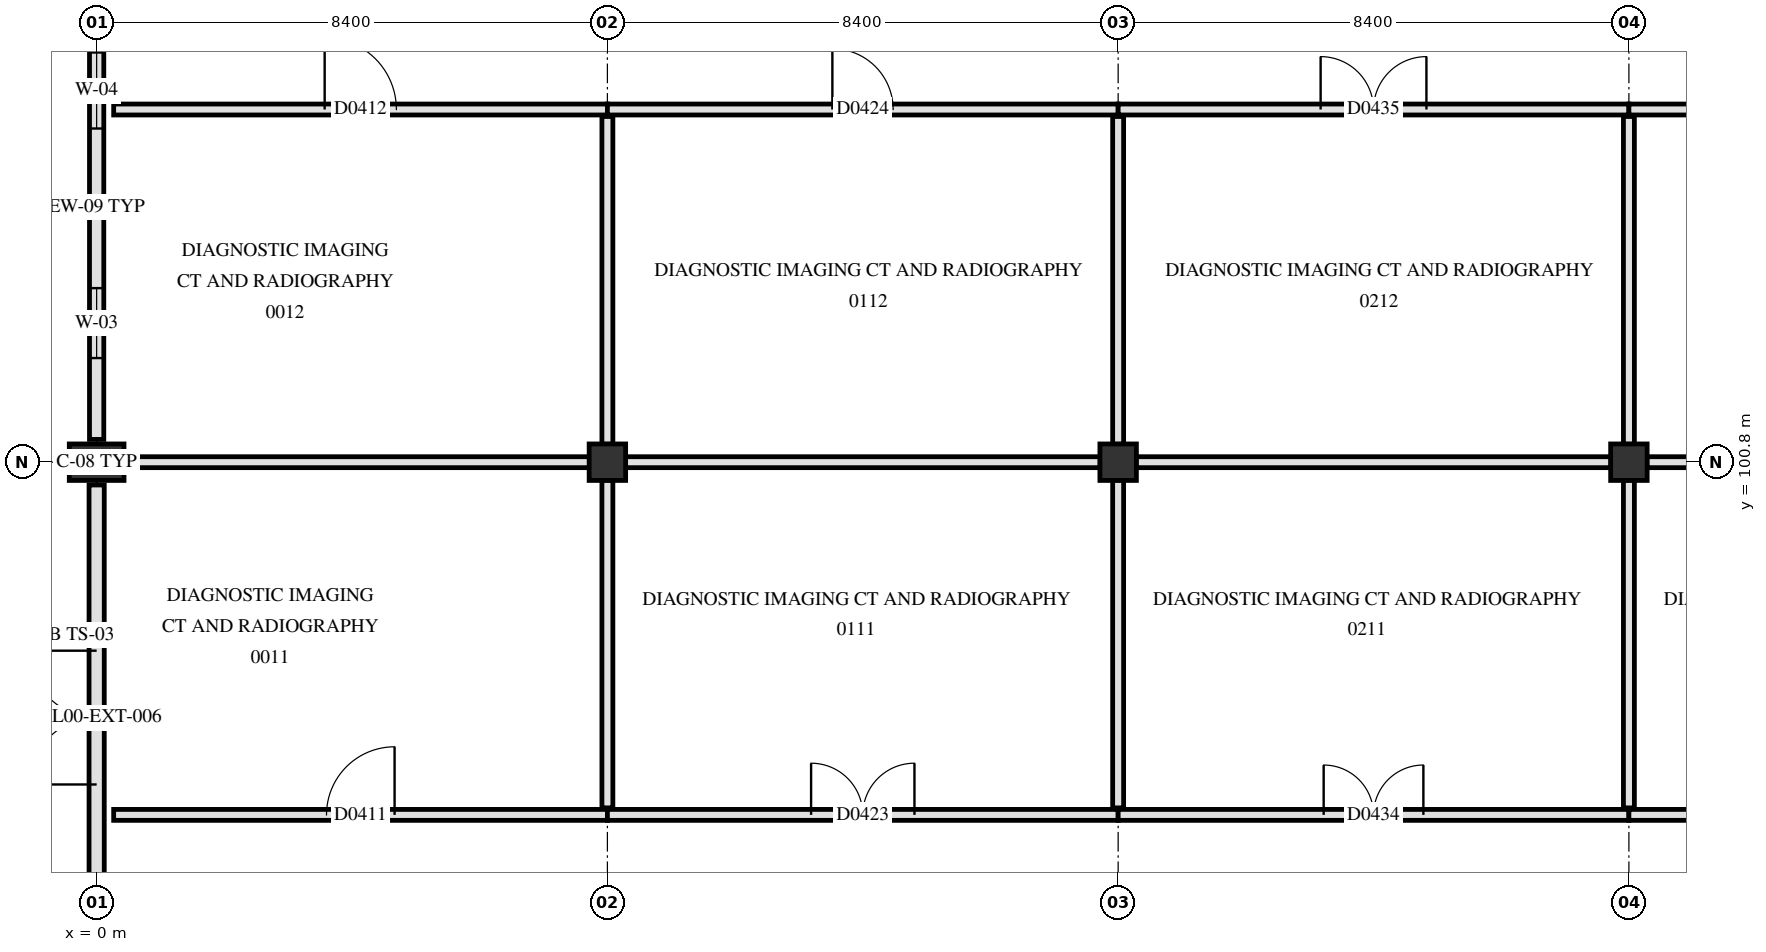
"""IFC4 building model, lengths in metres.
Left out: names, types, materials, properties, quantities, classifications, styles, units other than length and angle.
Written with IfcOpenShell. Run it as: python <this file> out.ifc"""

import sys

from ifc_helpers import new_model, si_unit, direction, frame, frame_2d, origin, origin_2d, place, context, subcontext, project, spatial, rectangle, extrude, element, fill, save


model = new_model("IFC4")
c1 = context("Model", 3, precision=1e-05, world=origin(), true_north=direction((0.0, 1.0)))
c2 = subcontext(c1, "Body", "Model", "MODEL_VIEW")
j1 = project(units=[si_unit("LENGTHUNIT", "METRE"), si_unit("PLANEANGLEUNIT", "RADIAN")], contexts=[c1])
p1 = place(None, origin())
s1 = spatial("IfcSite", under=j1, at=p1, CompositionType="ELEMENT")
p2 = place(p1, origin())
s2 = spatial("IfcBuilding", under=s1, at=p2, CompositionType="ELEMENT")
p3 = place(p2, origin())
s3 = spatial("IfcBuildingStorey", under=s2, at=p3, CompositionType="ELEMENT", Elevation=0.0)
p4 = place(p3, frame((0.0, 100.8, 0.0), z_axis=(0.0, 0.0, 1.0), x_axis=(0.0, 1.0, 0.0)))
e1 = element("IfcColumn", 1, at=p4, inside=s3, PredefinedType="PILASTER", context=c2, shape_type="SweptSolid", body=[
    extrude(rectangle(XDim=0.6, YDim=0.9, at=origin_2d()), origin(), (0.0, 0.0, 1.0), 4.8),
])
for number, where, z_axis, x_axis in (
    (2, (8.4, 100.8, 0.0), (0.0, 0.0, 1.0), (1.0, 0.0, 0.0)),
    (3, (16.8, 100.8, 0.0), (0.0, 0.0, 1.0), (1.0, 0.0, 0.0)),
    (4, (25.2, 100.8, 0.0), (0.0, 0.0, 1.0), (1.0, 0.0, 0.0)),
):
    element("IfcColumn", number, at=place(p3, frame(where, z_axis=z_axis, x_axis=x_axis)), inside=s3, PredefinedType="COLUMN", context=c2, shape_type="SweptSolid", body=[
        extrude(rectangle(XDim=0.6, YDim=0.6, at=origin_2d()), origin(), (0.0, 0.0, 1.0), 4.8),
    ])
p5 = place(p3, frame((0.0, 92.775, 0.0), z_axis=(0.0, 0.0, 1.0), x_axis=(0.0, 1.0, 0.0)))
e5 = element("IfcWall", 5, at=p5, inside=s3, PredefinedType="SOLIDWALL", context=c2, shape_type="SweptSolid", body=[
    extrude(rectangle(XDim=7.65, YDim=0.25, at=frame_2d((3.825, 0.0))), origin(), (0.0, 0.0, 1.0), 3.79),
])
p6 = place(p5, frame((2.725, 0.0, 0.0)))
e6 = element("IfcOpeningElement", 6, at=p6, cuts=e5, PredefinedType="OPENING", context=c2, shape_type="SweptSolid", body=[
    extrude(rectangle(XDim=2.2, YDim=2.35, at=frame_2d((1.1, 1.175))), frame((0.0, 0.135, 0.0), z_axis=(0.0, -1.0, 0.0), x_axis=(1.0, 0.0, 0.0)), (0.0, 0.0, 1.0), 0.27),
])
p7 = place(p3, frame((0.0, 101.175, 0.0), z_axis=(0.0, 0.0, 1.0), x_axis=(0.0, 1.0, 0.0)))
e7 = element("IfcWall", 7, at=p7, inside=s3, PredefinedType="SOLIDWALL", context=c2, shape_type="SweptSolid", body=[
    extrude(rectangle(XDim=7.65, YDim=0.235, at=frame_2d((3.825, 0.0))), origin(), (0.0, 0.0, 1.0), 3.79),
])
p8 = place(p7, frame((1.337, 0.0, 0.85)))
e8 = element("IfcOpeningElement", 8, at=p8, cuts=e7, PredefinedType="OPENING", context=c2, shape_type="SweptSolid", body=[
    extrude(rectangle(XDim=1.15, YDim=1.3, at=frame_2d((0.575, 0.65))), frame((0.0, 0.127, 0.0), z_axis=(0.0, -1.0, 0.0), x_axis=(1.0, 0.0, 0.0)), (0.0, 0.0, 1.0), 0.255),
])
p9 = place(p7, frame((5.113, 0.0, 0.85)))
e9 = element("IfcOpeningElement", 9, at=p9, cuts=e7, PredefinedType="OPENING", context=c2, shape_type="SweptSolid", body=[
    extrude(rectangle(XDim=1.25, YDim=1.3, at=frame_2d((0.625, 0.65))), frame((0.0, 0.127, 0.0), z_axis=(0.0, -1.0, 0.0), x_axis=(1.0, 0.0, 0.0)), (0.0, 0.0, 1.0), 0.255),
])
p10 = place(p3, frame((0.28, 95.0, 0.0), z_axis=(0.0, 0.0, 1.0), x_axis=(1.0, 0.0, 0.0)))
e10 = element("IfcWall", 10, at=p10, inside=s3, PredefinedType="PARTITIONING", context=c2, shape_type="SweptSolid", body=[
    extrude(rectangle(XDim=8.12, YDim=0.18, at=frame_2d((4.06, 0.0))), origin(), (0.0, 0.0, 1.0), 3.89),
])
p11 = place(p10, frame((3.5, 0.0, 0.0)))
e11 = element("IfcOpeningElement", 11, at=p11, cuts=e10, PredefinedType="OPENING", context=c2, shape_type="SweptSolid", body=[
    extrude(rectangle(XDim=1.12, YDim=2.18, at=frame_2d((0.56, 1.09))), frame((0.0, 0.1, 0.0), z_axis=(0.0, -1.0, 0.0), x_axis=(1.0, 0.0, 0.0)), (0.0, 0.0, 1.0), 0.2),
])
p12 = place(p3, frame((8.4, 95.0, 0.0), z_axis=(0.0, 0.0, 1.0), x_axis=(1.0, 0.0, 0.0)))
e12 = element("IfcWall", 12, at=p12, inside=s3, PredefinedType="PARTITIONING", context=c2, shape_type="SweptSolid", body=[
    extrude(rectangle(XDim=8.4, YDim=0.18, at=frame_2d((4.2, 0.0))), origin(), (0.0, 0.0, 1.0), 3.89),
])
p13 = place(p12, frame((3.35, 0.0, 0.0)))
e13 = element("IfcOpeningElement", 13, at=p13, cuts=e12, PredefinedType="OPENING", context=c2, shape_type="SweptSolid", body=[
    extrude(rectangle(XDim=1.7, YDim=2.25, at=frame_2d((0.85, 1.125))), frame((0.0, 0.1, 0.0), z_axis=(0.0, -1.0, 0.0), x_axis=(1.0, 0.0, 0.0)), (0.0, 0.0, 1.0), 0.2),
])
p14 = place(p3, frame((16.8, 95.0, 0.0), z_axis=(0.0, 0.0, 1.0), x_axis=(1.0, 0.0, 0.0)))
e14 = element("IfcWall", 14, at=p14, inside=s3, PredefinedType="PARTITIONING", context=c2, shape_type="SweptSolid", body=[
    extrude(rectangle(XDim=8.4, YDim=0.18, at=frame_2d((4.2, 0.0))), origin(), (0.0, 0.0, 1.0), 3.89),
])
p15 = place(p14, frame((3.38, 0.0, 0.0)))
e15 = element("IfcOpeningElement", 15, at=p15, cuts=e14, PredefinedType="OPENING", context=c2, shape_type="SweptSolid", body=[
    extrude(rectangle(XDim=1.64, YDim=2.28, at=frame_2d((0.82, 1.14))), frame((0.0, 0.1, 0.0), z_axis=(0.0, -1.0, 0.0), x_axis=(1.0, 0.0, 0.0)), (0.0, 0.0, 1.0), 0.2),
])
p16 = place(p3, frame((25.2, 95.0, 0.0), z_axis=(0.0, 0.0, 1.0), x_axis=(1.0, 0.0, 0.0)))
e16 = element("IfcWall", 16, at=p16, inside=s3, PredefinedType="PARTITIONING", context=c2, shape_type="SweptSolid", body=[
    extrude(rectangle(XDim=8.4, YDim=0.18, at=frame_2d((4.2, 0.0))), origin(), (0.0, 0.0, 1.0), 3.89),
])
p17 = place(p16, frame((3.49, 0.0, 0.0)))
e17 = element("IfcOpeningElement", 17, at=p17, cuts=e16, PredefinedType="OPENING", context=c2, shape_type="SweptSolid", body=[
    extrude(rectangle(XDim=1.42, YDim=2.22, at=frame_2d((0.71, 1.11))), frame((0.0, 0.1, 0.0), z_axis=(0.0, -1.0, 0.0), x_axis=(1.0, 0.0, 0.0)), (0.0, 0.0, 1.0), 0.2),
])
p18 = place(p3, frame((0.295, 100.8, 0.0), z_axis=(0.0, 0.0, 1.0), x_axis=(1.0, 0.0, 0.0)))
e18 = element("IfcWall", 18, at=p18, inside=s3, PredefinedType="PARTITIONING", context=c2, shape_type="SweptSolid", body=[
    extrude(rectangle(XDim=7.81, YDim=0.18, at=frame_2d((3.905, 0.0))), origin(), (0.0, 0.0, 1.0), 3.84),
])
p19 = place(p3, frame((8.695, 100.8, 0.0), z_axis=(0.0, 0.0, 1.0), x_axis=(1.0, 0.0, 0.0)))
e19 = element("IfcWall", 19, at=p19, inside=s3, PredefinedType="PARTITIONING", context=c2, shape_type="SweptSolid", body=[
    extrude(rectangle(XDim=7.81, YDim=0.18, at=frame_2d((3.905, 0.0))), origin(), (0.0, 0.0, 1.0), 3.84),
])
p20 = place(p3, frame((17.095, 100.8, 0.0), z_axis=(0.0, 0.0, 1.0), x_axis=(1.0, 0.0, 0.0)))
e20 = element("IfcWall", 20, at=p20, inside=s3, PredefinedType="PARTITIONING", context=c2, shape_type="SweptSolid", body=[
    extrude(rectangle(XDim=7.81, YDim=0.18, at=frame_2d((3.905, 0.0))), origin(), (0.0, 0.0, 1.0), 3.84),
])
p21 = place(p3, frame((25.495, 100.8, 0.0), z_axis=(0.0, 0.0, 1.0), x_axis=(1.0, 0.0, 0.0)))
e21 = element("IfcWall", 21, at=p21, inside=s3, PredefinedType="PARTITIONING", context=c2, shape_type="SweptSolid", body=[
    extrude(rectangle(XDim=7.81, YDim=0.18, at=frame_2d((3.905, 0.0))), origin(), (0.0, 0.0, 1.0), 3.84),
])
p22 = place(p3, frame((0.28, 106.6, 0.0), z_axis=(0.0, 0.0, 1.0), x_axis=(1.0, 0.0, 0.0)))
e22 = element("IfcWall", 22, at=p22, inside=s3, PredefinedType="PARTITIONING", context=c2, shape_type="SweptSolid", body=[
    extrude(rectangle(XDim=8.12, YDim=0.18, at=frame_2d((4.06, 0.0))), origin(), (0.0, 0.0, 1.0), 3.89),
])
p23 = place(p22, frame((3.47, 0.0, 0.0)))
e23 = element("IfcOpeningElement", 23, at=p23, cuts=e22, PredefinedType="OPENING", context=c2, shape_type="SweptSolid", body=[
    extrude(rectangle(XDim=1.18, YDim=2.18, at=frame_2d((0.59, 1.09))), frame((0.0, 0.1, 0.0), z_axis=(0.0, -1.0, 0.0), x_axis=(1.0, 0.0, 0.0)), (0.0, 0.0, 1.0), 0.2),
])
p24 = place(p3, frame((8.4, 106.6, 0.0), z_axis=(0.0, 0.0, 1.0), x_axis=(1.0, 0.0, 0.0)))
e24 = element("IfcWall", 24, at=p24, inside=s3, PredefinedType="PARTITIONING", context=c2, shape_type="SweptSolid", body=[
    extrude(rectangle(XDim=8.4, YDim=0.18, at=frame_2d((4.2, 0.0))), origin(), (0.0, 0.0, 1.0), 3.89),
])
p25 = place(p24, frame((3.7, 0.0, 0.0)))
e25 = element("IfcOpeningElement", 25, at=p25, cuts=e24, PredefinedType="OPENING", context=c2, shape_type="SweptSolid", body=[
    extrude(rectangle(XDim=1.0, YDim=2.15, at=frame_2d((0.5, 1.075))), frame((0.0, 0.1, 0.0), z_axis=(0.0, -1.0, 0.0), x_axis=(1.0, 0.0, 0.0)), (0.0, 0.0, 1.0), 0.2),
])
p26 = place(p3, frame((16.8, 106.6, 0.0), z_axis=(0.0, 0.0, 1.0), x_axis=(1.0, 0.0, 0.0)))
e26 = element("IfcWall", 26, at=p26, inside=s3, PredefinedType="PARTITIONING", context=c2, shape_type="SweptSolid", body=[
    extrude(rectangle(XDim=8.4, YDim=0.18, at=frame_2d((4.2, 0.0))), origin(), (0.0, 0.0, 1.0), 3.89),
])
p27 = place(p26, frame((3.33, 0.0, 0.0)))
e27 = element("IfcOpeningElement", 27, at=p27, cuts=e26, PredefinedType="OPENING", context=c2, shape_type="SweptSolid", body=[
    extrude(rectangle(XDim=1.74, YDim=2.24, at=frame_2d((0.87, 1.12))), frame((0.0, 0.1, 0.0), z_axis=(0.0, -1.0, 0.0), x_axis=(1.0, 0.0, 0.0)), (0.0, 0.0, 1.0), 0.2),
])
p28 = place(p3, frame((25.2, 106.6, 0.0), z_axis=(0.0, 0.0, 1.0), x_axis=(1.0, 0.0, 0.0)))
e28 = element("IfcWall", 28, at=p28, inside=s3, PredefinedType="PARTITIONING", context=c2, shape_type="SweptSolid", body=[
    extrude(rectangle(XDim=5.95, YDim=0.18, at=frame_2d((2.975, 0.0))), origin(), (0.0, 0.0, 1.0), 3.89),
])
p29 = place(p28, frame((2.185, 0.0, 0.0)))
e29 = element("IfcOpeningElement", 29, at=p29, cuts=e28, PredefinedType="OPENING", context=c2, shape_type="SweptSolid", body=[
    extrude(rectangle(XDim=1.58, YDim=2.22, at=frame_2d((0.79, 1.11))), frame((0.0, 0.1, 0.0), z_axis=(0.0, -1.0, 0.0), x_axis=(1.0, 0.0, 0.0)), (0.0, 0.0, 1.0), 0.2),
])
p30 = place(p3, frame((8.4, 95.115, 0.0), z_axis=(0.0, 0.0, 1.0), x_axis=(0.0, 1.0, 0.0)))
e30 = element("IfcWall", 30, at=p30, inside=s3, PredefinedType="PARTITIONING", context=c2, shape_type="SweptSolid", body=[
    extrude(rectangle(XDim=5.39, YDim=0.18, at=frame_2d((2.695, 0.0))), origin(), (0.0, 0.0, 1.0), 3.89),
])
p31 = place(p3, frame((8.4, 101.095, 0.0), z_axis=(0.0, 0.0, 1.0), x_axis=(0.0, 1.0, 0.0)))
e31 = element("IfcWall", 31, at=p31, inside=s3, PredefinedType="PARTITIONING", context=c2, shape_type="SweptSolid", body=[
    extrude(rectangle(XDim=5.39, YDim=0.18, at=frame_2d((2.695, 0.0))), origin(), (0.0, 0.0, 1.0), 3.89),
])
p32 = place(p3, frame((16.8, 95.115, 0.0), z_axis=(0.0, 0.0, 1.0), x_axis=(0.0, 1.0, 0.0)))
e32 = element("IfcWall", 32, at=p32, inside=s3, PredefinedType="PARTITIONING", context=c2, shape_type="SweptSolid", body=[
    extrude(rectangle(XDim=5.39, YDim=0.18, at=frame_2d((2.695, 0.0))), origin(), (0.0, 0.0, 1.0), 3.89),
])
p33 = place(p3, frame((16.8, 101.095, 0.0), z_axis=(0.0, 0.0, 1.0), x_axis=(0.0, 1.0, 0.0)))
e33 = element("IfcWall", 33, at=p33, inside=s3, PredefinedType="PARTITIONING", context=c2, shape_type="SweptSolid", body=[
    extrude(rectangle(XDim=5.39, YDim=0.18, at=frame_2d((2.695, 0.0))), origin(), (0.0, 0.0, 1.0), 3.89),
])
p34 = place(p3, frame((25.2, 95.115, 0.0), z_axis=(0.0, 0.0, 1.0), x_axis=(0.0, 1.0, 0.0)))
e34 = element("IfcWall", 34, at=p34, inside=s3, PredefinedType="PARTITIONING", context=c2, shape_type="SweptSolid", body=[
    extrude(rectangle(XDim=5.39, YDim=0.18, at=frame_2d((2.695, 0.0))), origin(), (0.0, 0.0, 1.0), 3.89),
])
p35 = place(p3, frame((25.2, 101.095, 0.0), z_axis=(0.0, 0.0, 1.0), x_axis=(0.0, 1.0, 0.0)))
e35 = element("IfcWall", 35, at=p35, inside=s3, PredefinedType="PARTITIONING", context=c2, shape_type="SweptSolid", body=[
    extrude(rectangle(XDim=5.39, YDim=0.18, at=frame_2d((2.695, 0.0))), origin(), (0.0, 0.0, 1.0), 3.89),
])
p36 = place(p6, origin())
e36 = element("IfcDoor", 36, at=p36, inside=s3, OperationType="DOUBLE_SWING_LEFT", PredefinedType="DOOR", context=c2, shape_type="SweptSolid", body=[
    extrude(rectangle(XDim=2.2, YDim=2.35, at=frame_2d((1.1, 1.175))), frame((0.0, 0.025, 0.0), z_axis=(0.0, -1.0, 0.0), x_axis=(1.0, 0.0, 0.0)), (0.0, 0.0, 1.0), 0.05),
])
fill(e6, e36)
p37 = place(p8, origin())
e37 = element("IfcWindow", 37, at=p37, inside=s3, PartitioningType="SINGLE_PANEL", PredefinedType="WINDOW", context=c2, shape_type="SweptSolid", body=[
    extrude(rectangle(XDim=1.15, YDim=1.3, at=frame_2d((0.575, 0.65))), frame((0.0, 0.03, 0.0), z_axis=(0.0, -1.0, 0.0), x_axis=(1.0, 0.0, 0.0)), (0.0, 0.0, 1.0), 0.06),
])
fill(e8, e37)
p38 = place(p9, origin())
e38 = element("IfcWindow", 38, at=p38, inside=s3, PartitioningType="SINGLE_PANEL", PredefinedType="WINDOW", context=c2, shape_type="SweptSolid", body=[
    extrude(rectangle(XDim=1.25, YDim=1.3, at=frame_2d((0.625, 0.65))), frame((0.0, 0.03, 0.0), z_axis=(0.0, -1.0, 0.0), x_axis=(1.0, 0.0, 0.0)), (0.0, 0.0, 1.0), 0.06),
])
fill(e9, e38)
p39 = place(p11, origin())
e39 = element("IfcDoor", 39, at=p39, inside=s3, OperationType="SINGLE_SWING_RIGHT", PredefinedType="DOOR", context=c2, shape_type="SweptSolid", body=[
    extrude(rectangle(XDim=1.12, YDim=2.18, at=frame_2d((0.56, 1.09))), frame((0.0, 0.025, 0.0), z_axis=(0.0, -1.0, 0.0), x_axis=(1.0, 0.0, 0.0)), (0.0, 0.0, 1.0), 0.05),
])
fill(e11, e39)
p40 = place(p23, origin())
e40 = element("IfcDoor", 40, at=p40, inside=s3, OperationType="SINGLE_SWING_LEFT", PredefinedType="DOOR", context=c2, shape_type="SweptSolid", body=[
    extrude(rectangle(XDim=1.18, YDim=2.18, at=frame_2d((0.59, 1.09))), frame((0.0, 0.025, 0.0), z_axis=(0.0, -1.0, 0.0), x_axis=(1.0, 0.0, 0.0)), (0.0, 0.0, 1.0), 0.05),
])
fill(e23, e40)
p41 = place(p13, origin())
e41 = element("IfcDoor", 41, at=p41, inside=s3, OperationType="DOUBLE_SWING_RIGHT", PredefinedType="DOOR", context=c2, shape_type="SweptSolid", body=[
    extrude(rectangle(XDim=1.7, YDim=2.25, at=frame_2d((0.85, 1.125))), frame((0.0, 0.025, 0.0), z_axis=(0.0, -1.0, 0.0), x_axis=(1.0, 0.0, 0.0)), (0.0, 0.0, 1.0), 0.05),
])
fill(e13, e41)
p42 = place(p25, origin())
e42 = element("IfcDoor", 42, at=p42, inside=s3, OperationType="SINGLE_SWING_LEFT", PredefinedType="DOOR", context=c2, shape_type="SweptSolid", body=[
    extrude(rectangle(XDim=1.0, YDim=2.15, at=frame_2d((0.5, 1.075))), frame((0.0, 0.025, 0.0), z_axis=(0.0, -1.0, 0.0), x_axis=(1.0, 0.0, 0.0)), (0.0, 0.0, 1.0), 0.05),
])
fill(e25, e42)
p43 = place(p15, origin())
e43 = element("IfcDoor", 43, at=p43, inside=s3, OperationType="DOUBLE_SWING_LEFT", PredefinedType="DOOR", context=c2, shape_type="SweptSolid", body=[
    extrude(rectangle(XDim=1.64, YDim=2.28, at=frame_2d((0.82, 1.14))), frame((0.0, 0.025, 0.0), z_axis=(0.0, -1.0, 0.0), x_axis=(1.0, 0.0, 0.0)), (0.0, 0.0, 1.0), 0.05),
])
fill(e15, e43)
p44 = place(p27, origin())
e44 = element("IfcDoor", 44, at=p44, inside=s3, OperationType="DOUBLE_SWING_RIGHT", PredefinedType="DOOR", context=c2, shape_type="SweptSolid", body=[
    extrude(rectangle(XDim=1.74, YDim=2.24, at=frame_2d((0.87, 1.12))), frame((0.0, 0.025, 0.0), z_axis=(0.0, -1.0, 0.0), x_axis=(1.0, 0.0, 0.0)), (0.0, 0.0, 1.0), 0.05),
])
fill(e27, e44)
save(model, sys.argv[1])
